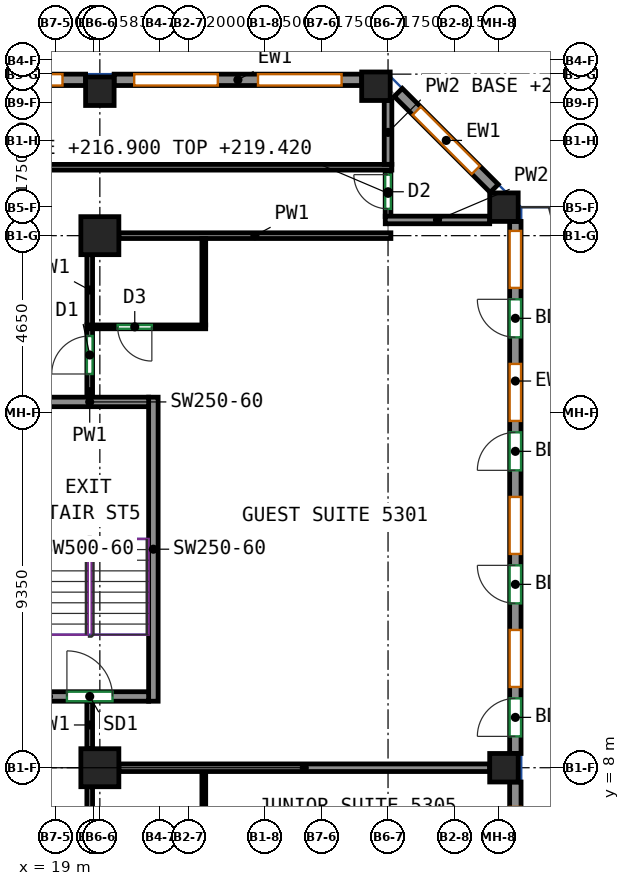
"""IFC4 building model, lengths in metres.
Left out: names, types, materials, properties, quantities, classifications, styles, units other than length and angle.
Written with IfcOpenShell. Run it as: python <this file> out.ifc"""

import sys

from ifc_helpers import new_model, si_unit, direction, frame, frame_2d, origin, origin_2d, place, context, subcontext, project, spatial, rectangle, extrude, source, transform, mapped, element, fill, save


model = new_model("IFC4")
c1 = context("Model", 3, precision=1e-05, world=origin(), true_north=direction((0.0, 1.0)))
c2 = subcontext(c1, "Body", "Model", "MODEL_VIEW")
j1 = project(units=[si_unit("LENGTHUNIT", "METRE"), si_unit("PLANEANGLEUNIT", "RADIAN")], contexts=[c1])
p1 = place(None, origin())
s1 = spatial("IfcSite", under=j1, at=p1, CompositionType="ELEMENT")
p2 = place(p1, origin())
s2 = spatial("IfcBuilding", under=s1, at=p2, CompositionType="ELEMENT")
p3 = place(p2, frame((0.0, 0.0, 216.9)))
s3 = spatial("IfcBuildingStorey", under=s2, at=p3, CompositionType="ELEMENT", Elevation=216.9)
m1 = source(origin(), c2, "Body", "SweptSolid", [
    extrude(rectangle(XDim=1.0, YDim=1.0, at=origin_2d()), origin(), (0.0, 0.0, 1.0), 3.12),
])
for number, where, z_axis, x_axis in (
    (1, (20.167, 8.0, 0.0), (0.0, 0.0, 1.0), (1.0, 0.0, 0.0)),
    (2, (20.167, 22.0, 0.0), (0.0, 0.0, 1.0), (1.0, 0.0, 0.0)),
):
    element("IfcColumn", number, at=place(p3, frame(where, z_axis=z_axis, x_axis=x_axis)), inside=s3, PredefinedType="COLUMN", context=c2, shape_type="MappedRepresentation", body=[
        mapped(m1, transform((0.0, 0.0, 0.0))),
    ])
m2 = source(origin(), c2, "Body", "SweptSolid", [
    extrude(rectangle(XDim=0.75, YDim=0.75, at=origin_2d()), origin(), (0.0, 0.0, 1.0), 3.12),
])
for number, where, z_axis, x_axis in (
    (3, (20.167, 25.8, 0.0), (0.0, 0.0, 1.0), (1.0, 0.0, 0.0)),
    (4, (27.432, 25.932, 0.0), (0.0, 0.0, 1.0), (1.0, 0.0, 0.0)),
    (5, (30.8, 8.0, 0.0), (0.0, 0.0, 1.0), (1.0, 0.0, 0.0)),
    (6, (30.8, 22.75, 0.0), (0.0, 0.0, 1.0), (1.0, 0.0, 0.0)),
):
    element("IfcColumn", number, at=place(p3, frame(where, z_axis=z_axis, x_axis=x_axis)), inside=s3, PredefinedType="COLUMN", context=c2, shape_type="MappedRepresentation", body=[
        mapped(m2, transform((0.0, 0.0, 0.0))),
    ])
m3 = source(origin(), c2, "Body", "SweptSolid", [
    extrude(rectangle(XDim=8.0, YDim=0.25, at=frame_2d((4.0, 0.0))), origin(), (0.0, 0.0, 1.0), 3.12),
])
p4 = place(p3, frame((21.575, 9.75, 0.0), z_axis=(0.0, 0.0, 1.0), x_axis=(0.0, 1.0, 0.0)))
e7 = element("IfcWall", 7, at=p4, inside=s3, PredefinedType="SHEAR", context=c2, shape_type="MappedRepresentation", body=[
    mapped(m3, transform((0.0, 0.0, 0.0))),
])
m4 = source(origin(), c2, "Body", "SweptSolid", [
    extrude(rectangle(XDim=3.1, YDim=0.25, at=frame_2d((1.55, 0.0))), origin(), (0.0, 0.0, 1.0), 3.12),
])
p5 = place(p3, frame((18.35, 9.875, 0.0), z_axis=(0.0, 0.0, 1.0), x_axis=(1.0, 0.0, 0.0)))
e8 = element("IfcWall", 8, at=p5, inside=s3, PredefinedType="SHEAR", context=c2, shape_type="MappedRepresentation", body=[
    mapped(m4, transform((0.0, 0.0, 0.0))),
])
p6 = place(p5, frame((0.95, 0.0, 0.0)))
e9 = element("IfcOpeningElement", 9, at=p6, cuts=e8, PredefinedType="OPENING", context=c2, shape_type="SweptSolid", body=[
    extrude(rectangle(XDim=1.2, YDim=2.1, at=frame_2d((0.6, 1.05))), frame((0.0, 0.135, 0.0), z_axis=(0.0, -1.0, 0.0), x_axis=(1.0, 0.0, 0.0)), (0.0, 0.0, 1.0), 0.27),
])
p7 = place(p3, frame((18.35, 17.625, 0.0), z_axis=(0.0, 0.0, 1.0), x_axis=(1.0, 0.0, 0.0)))
e10 = element("IfcWall", 10, at=p7, inside=s3, PredefinedType="SHEAR", context=c2, shape_type="MappedRepresentation", body=[
    mapped(m4, transform((0.0, 0.0, 0.0))),
])
m5 = source(origin(), c2, "Body", "SweptSolid", [
    extrude(rectangle(XDim=7.812, YDim=0.3, at=frame_2d((3.906, 0.0))), origin(), (0.0, 0.0, 1.0), 3.12),
])
p8 = place(p3, frame((31.1, -0.188, 0.0), z_axis=(0.0, 0.0, 1.0), x_axis=(0.0, 1.0, 0.0)))
e11 = element("IfcWall", 11, at=p8, inside=s3, PredefinedType="SOLIDWALL", context=c2, shape_type="MappedRepresentation", body=[
    mapped(m5, transform((0.0, 0.0, 0.0))),
])
p9 = place(p8, frame((1.75, 0.0, 0.85)))
e12 = element("IfcOpeningElement", 12, at=p9, cuts=e11, PredefinedType="OPENING", context=c2, shape_type="SweptSolid", body=[
    extrude(rectangle(XDim=1.5, YDim=1.95, at=frame_2d((0.75, 0.975))), frame((0.0, 0.16, 0.0), z_axis=(0.0, -1.0, 0.0), x_axis=(1.0, 0.0, 0.0)), (0.0, 0.0, 1.0), 0.32),
])
p10 = place(p8, frame((5.656, 0.0, 0.85)))
e13 = element("IfcOpeningElement", 13, at=p10, cuts=e11, PredefinedType="OPENING", context=c2, shape_type="SweptSolid", body=[
    extrude(rectangle(XDim=1.5, YDim=1.95, at=frame_2d((0.75, 0.975))), frame((0.0, 0.16, 0.0), z_axis=(0.0, -1.0, 0.0), x_axis=(1.0, 0.0, 0.0)), (0.0, 0.0, 1.0), 0.32),
])
m6 = source(origin(), c2, "Body", "SweptSolid", [
    extrude(rectangle(XDim=14.0, YDim=0.3, at=frame_2d((7.0, 0.0))), origin(), (0.0, 0.0, 1.0), 3.12),
])
p11 = place(p3, frame((31.1, 8.375, 0.0), z_axis=(0.0, 0.0, 1.0), x_axis=(0.0, 1.0, 0.0)))
e14 = element("IfcWall", 14, at=p11, inside=s3, PredefinedType="SOLIDWALL", context=c2, shape_type="MappedRepresentation", body=[
    mapped(m6, transform((0.0, 0.0, 0.0))),
])
p12 = place(p11, frame((1.75, 0.0, 0.85)))
e15 = element("IfcOpeningElement", 15, at=p12, cuts=e14, PredefinedType="OPENING", context=c2, shape_type="SweptSolid", body=[
    extrude(rectangle(XDim=1.5, YDim=1.95, at=frame_2d((0.75, 0.975))), frame((0.0, 0.16, 0.0), z_axis=(0.0, -1.0, 0.0), x_axis=(1.0, 0.0, 0.0)), (0.0, 0.0, 1.0), 0.32),
])
p13 = place(p11, frame((0.45, 0.0, 0.0)))
e16 = element("IfcOpeningElement", 16, at=p13, cuts=e14, PredefinedType="OPENING", context=c2, shape_type="SweptSolid", body=[
    extrude(rectangle(XDim=1.0, YDim=2.1, at=frame_2d((0.5, 1.05))), frame((0.0, 0.16, 0.0), z_axis=(0.0, -1.0, 0.0), x_axis=(1.0, 0.0, 0.0)), (0.0, 0.0, 1.0), 0.32),
])
p14 = place(p11, frame((5.25, 0.0, 0.85)))
e17 = element("IfcOpeningElement", 17, at=p14, cuts=e14, PredefinedType="OPENING", context=c2, shape_type="SweptSolid", body=[
    extrude(rectangle(XDim=1.5, YDim=1.95, at=frame_2d((0.75, 0.975))), frame((0.0, 0.16, 0.0), z_axis=(0.0, -1.0, 0.0), x_axis=(1.0, 0.0, 0.0)), (0.0, 0.0, 1.0), 0.32),
])
p15 = place(p11, frame((3.95, 0.0, 0.0)))
e18 = element("IfcOpeningElement", 18, at=p15, cuts=e14, PredefinedType="OPENING", context=c2, shape_type="SweptSolid", body=[
    extrude(rectangle(XDim=1.0, YDim=2.1, at=frame_2d((0.5, 1.05))), frame((0.0, 0.16, 0.0), z_axis=(0.0, -1.0, 0.0), x_axis=(1.0, 0.0, 0.0)), (0.0, 0.0, 1.0), 0.32),
])
p16 = place(p11, frame((8.75, 0.0, 0.85)))
e19 = element("IfcOpeningElement", 19, at=p16, cuts=e14, PredefinedType="OPENING", context=c2, shape_type="SweptSolid", body=[
    extrude(rectangle(XDim=1.5, YDim=1.95, at=frame_2d((0.75, 0.975))), frame((0.0, 0.16, 0.0), z_axis=(0.0, -1.0, 0.0), x_axis=(1.0, 0.0, 0.0)), (0.0, 0.0, 1.0), 0.32),
])
p17 = place(p11, frame((7.45, 0.0, 0.0)))
e20 = element("IfcOpeningElement", 20, at=p17, cuts=e14, PredefinedType="OPENING", context=c2, shape_type="SweptSolid", body=[
    extrude(rectangle(XDim=1.0, YDim=2.1, at=frame_2d((0.5, 1.05))), frame((0.0, 0.16, 0.0), z_axis=(0.0, -1.0, 0.0), x_axis=(1.0, 0.0, 0.0)), (0.0, 0.0, 1.0), 0.32),
])
p18 = place(p11, frame((12.25, 0.0, 0.85)))
e21 = element("IfcOpeningElement", 21, at=p18, cuts=e14, PredefinedType="OPENING", context=c2, shape_type="SweptSolid", body=[
    extrude(rectangle(XDim=1.5, YDim=1.95, at=frame_2d((0.75, 0.975))), frame((0.0, 0.16, 0.0), z_axis=(0.0, -1.0, 0.0), x_axis=(1.0, 0.0, 0.0)), (0.0, 0.0, 1.0), 0.32),
])
p19 = place(p11, frame((10.95, 0.0, 0.0)))
e22 = element("IfcOpeningElement", 22, at=p19, cuts=e14, PredefinedType="OPENING", context=c2, shape_type="SweptSolid", body=[
    extrude(rectangle(XDim=1.0, YDim=2.1, at=frame_2d((0.5, 1.05))), frame((0.0, 0.16, 0.0), z_axis=(0.0, -1.0, 0.0), x_axis=(1.0, 0.0, 0.0)), (0.0, 0.0, 1.0), 0.32),
])
m7 = source(origin(), c2, "Body", "SweptSolid", [
    extrude(rectangle(XDim=3.571, YDim=0.3, at=frame_2d((1.786, 0.0))), origin(), (0.0, 0.0, 1.0), 3.12),
])
p20 = place(p3, frame((30.544, 23.244, 0.0), z_axis=(0.0, 0.0, 1.0), x_axis=(-0.707140964879, 0.707072595841, 0.0)))
e23 = element("IfcWall", 23, at=p20, inside=s3, PredefinedType="SOLIDWALL", context=c2, shape_type="MappedRepresentation", body=[
    mapped(m7, transform((0.0, 0.0, 0.0))),
])
p21 = place(p20, frame((0.686, 0.0, 0.85)))
e24 = element("IfcOpeningElement", 24, at=p21, cuts=e23, PredefinedType="OPENING", context=c2, shape_type="SweptSolid", body=[
    extrude(rectangle(XDim=2.2, YDim=1.95, at=frame_2d((1.1, 0.975))), frame((0.0, 0.16, 0.0), z_axis=(0.0, -1.0, 0.0), x_axis=(1.0, 0.0, 0.0)), (0.0, 0.0, 1.0), 0.32),
])
m8 = source(origin(), c2, "Body", "SweptSolid", [
    extrude(rectangle(XDim=6.515, YDim=0.3, at=frame_2d((3.258, 0.0))), origin(), (0.0, 0.0, 1.0), 3.12),
])
p22 = place(p3, frame((27.057, 26.1, 0.0), z_axis=(0.0, 0.0, 1.0), x_axis=(-1.0, 0.0, 0.0)))
e25 = element("IfcWall", 25, at=p22, inside=s3, PredefinedType="SOLIDWALL", context=c2, shape_type="MappedRepresentation", body=[
    mapped(m8, transform((0.0, 0.0, 0.0))),
])
p23 = place(p22, frame((0.529, 0.0, 0.85)))
e26 = element("IfcOpeningElement", 26, at=p23, cuts=e25, PredefinedType="OPENING", context=c2, shape_type="SweptSolid", body=[
    extrude(rectangle(XDim=2.2, YDim=1.95, at=frame_2d((1.1, 0.975))), frame((0.0, 0.16, 0.0), z_axis=(0.0, -1.0, 0.0), x_axis=(1.0, 0.0, 0.0)), (0.0, 0.0, 1.0), 0.32),
])
p24 = place(p22, frame((3.786, 0.0, 0.85)))
e27 = element("IfcOpeningElement", 27, at=p24, cuts=e25, PredefinedType="OPENING", context=c2, shape_type="SweptSolid", body=[
    extrude(rectangle(XDim=2.2, YDim=1.95, at=frame_2d((1.1, 0.975))), frame((0.0, 0.16, 0.0), z_axis=(0.0, -1.0, 0.0), x_axis=(1.0, 0.0, 0.0)), (0.0, 0.0, 1.0), 0.32),
])
m9 = source(origin(), c2, "Body", "SweptSolid", [
    extrude(rectangle(XDim=6.833, YDim=0.3, at=frame_2d((3.417, 0.0))), origin(), (0.0, 0.0, 1.0), 3.12),
])
p25 = place(p3, frame((19.792, 26.1, 0.0), z_axis=(0.0, 0.0, 1.0), x_axis=(-1.0, 0.0, 0.0)))
e28 = element("IfcWall", 28, at=p25, inside=s3, PredefinedType="SOLIDWALL", context=c2, shape_type="MappedRepresentation", body=[
    mapped(m9, transform((0.0, 0.0, 0.0))),
])
p26 = place(p25, frame((0.608, 0.0, 0.85)))
e29 = element("IfcOpeningElement", 29, at=p26, cuts=e28, PredefinedType="OPENING", context=c2, shape_type="SweptSolid", body=[
    extrude(rectangle(XDim=2.2, YDim=1.95, at=frame_2d((1.1, 0.975))), frame((0.0, 0.16, 0.0), z_axis=(0.0, -1.0, 0.0), x_axis=(1.0, 0.0, 0.0)), (0.0, 0.0, 1.0), 0.32),
])
p27 = place(p25, frame((4.025, 0.0, 0.85)))
e30 = element("IfcOpeningElement", 30, at=p27, cuts=e28, PredefinedType="OPENING", context=c2, shape_type="SweptSolid", body=[
    extrude(rectangle(XDim=2.2, YDim=1.95, at=frame_2d((1.1, 0.975))), frame((0.0, 0.16, 0.0), z_axis=(0.0, -1.0, 0.0), x_axis=(1.0, 0.0, 0.0)), (0.0, 0.0, 1.0), 0.32),
])
p28 = place(p3, frame((19.9, 5.64, 0.0), z_axis=(0.0, 0.0, 1.0), x_axis=(0.0, 1.0, 0.0)))
e31 = element("IfcWall", 31, at=p28, inside=s3, PredefinedType="PARTITIONING", context=c2, shape_type="SweptSolid", body=[
    extrude(rectangle(XDim=1.86, YDim=0.15, at=frame_2d((0.93, 0.0))), origin(), (0.0, 0.0, 1.0), 2.52),
])
p29 = place(p3, frame((19.9, 17.75, 0.0), z_axis=(0.0, 0.0, 1.0), x_axis=(0.0, 1.0, 0.0)))
e32 = element("IfcWall", 32, at=p29, inside=s3, PredefinedType="PARTITIONING", context=c2, shape_type="SweptSolid", body=[
    extrude(rectangle(XDim=1.81, YDim=0.15, at=frame_2d((0.905, 0.0))), origin(), (0.0, 0.0, 1.0), 3.12),
])
p30 = place(p29, frame((0.61, 0.0, 0.0)))
e33 = element("IfcOpeningElement", 33, at=p30, cuts=e32, PredefinedType="OPENING", context=c2, shape_type="SweptSolid", body=[
    extrude(rectangle(XDim=1.0, YDim=2.1, at=frame_2d((0.5, 1.05))), frame((0.0, 0.085, 0.0), z_axis=(0.0, -1.0, 0.0), x_axis=(1.0, 0.0, 0.0)), (0.0, 0.0, 1.0), 0.17),
])
p31 = place(p3, frame((19.9, 8.5, 0.0), z_axis=(0.0, 0.0, 1.0), x_axis=(0.0, 1.0, 0.0)))
e34 = element("IfcWall", 34, at=p31, inside=s3, PredefinedType="PARTITIONING", context=c2, shape_type="SweptSolid", body=[
    extrude(rectangle(XDim=1.25, YDim=0.15, at=frame_2d((0.625, 0.0))), origin(), (0.0, 0.0, 1.0), 3.12),
])
p32 = place(p3, frame((20.667, 22.0, 0.0), z_axis=(0.0, 0.0, 1.0), x_axis=(1.0, 0.0, 0.0)))
e35 = element("IfcWall", 35, at=p32, inside=s3, PredefinedType="PARTITIONING", context=c2, shape_type="SweptSolid", body=[
    extrude(rectangle(XDim=7.158, YDim=0.15, at=frame_2d((3.579, 0.0))), origin(), (0.0, 0.0, 1.0), 3.12),
])
p33 = place(p3, frame((19.9, 19.64, 0.0), z_axis=(0.0, 0.0, 1.0), x_axis=(0.0, 1.0, 0.0)))
e36 = element("IfcWall", 36, at=p33, inside=s3, PredefinedType="PARTITIONING", context=c2, shape_type="SweptSolid", body=[
    extrude(rectangle(XDim=1.86, YDim=0.15, at=frame_2d((0.93, 0.0))), origin(), (0.0, 0.0, 1.0), 3.12),
])
p34 = place(p3, frame((27.75, 22.503, 0.0), z_axis=(0.0, 0.0, 1.0), x_axis=(0.0, 1.0, 0.0)))
e37 = element("IfcWall", 37, at=p34, inside=s3, PredefinedType="PARTITIONING", context=c2, shape_type="SweptSolid", body=[
    extrude(rectangle(XDim=1.222, YDim=0.15, at=frame_2d((0.611, 0.0))), origin(), (0.0, 0.0, 1.0), 2.52),
])
p35 = place(p34, frame((0.202, 0.0, 0.0)))
e38 = element("IfcOpeningElement", 38, at=p35, cuts=e37, PredefinedType="OPENING", context=c2, shape_type="SweptSolid", body=[
    extrude(rectangle(XDim=0.9, YDim=2.1, at=frame_2d((0.45, 1.05))), frame((0.0, 0.085, 0.0), z_axis=(0.0, -1.0, 0.0), x_axis=(1.0, 0.0, 0.0)), (0.0, 0.0, 1.0), 0.17),
])
p36 = place(p3, frame((27.85, 23.8, 0.0), z_axis=(0.0, 0.0, 1.0), x_axis=(-1.0, 0.0, 0.0)))
e39 = element("IfcWall", 39, at=p36, inside=s3, PredefinedType="PARTITIONING", context=c2, shape_type="SweptSolid", body=[
    extrude(rectangle(XDim=45.7, YDim=0.15, at=frame_2d((22.85, 0.0))), origin(), (0.0, 0.0, 1.0), 3.12),
])
p37 = place(p36, frame((16.838, 0.0, 0.0)))
e40 = element("IfcOpeningElement", 40, at=p37, cuts=e39, PredefinedType="OPENING", context=c2, shape_type="SweptSolid", body=[
    extrude(rectangle(XDim=1.0, YDim=2.1, at=frame_2d((0.5, 1.05))), frame((0.0, 0.085, 0.0), z_axis=(0.0, -1.0, 0.0), x_axis=(1.0, 0.0, 0.0)), (0.0, 0.0, 1.0), 0.17),
])
p38 = place(p3, frame((22.902, 5.65, 0.0), z_axis=(0.0, 0.0, 1.0), x_axis=(0.0, 1.0, 0.0)))
e41 = element("IfcWall", 41, at=p38, inside=s3, PredefinedType="PARTITIONING", context=c2, shape_type="SweptSolid", body=[
    extrude(rectangle(XDim=2.25, YDim=0.1, at=frame_2d((1.125, 0.0))), origin(), (0.0, 0.0, 1.0), 3.12),
])
p39 = place(p3, frame((20.667, 8.0, 0.0), z_axis=(0.0, 0.0, 1.0), x_axis=(1.0, 0.0, 0.0)))
e42 = element("IfcWall", 42, at=p39, inside=s3, PredefinedType="PARTITIONING", context=c2, shape_type="SweptSolid", body=[
    extrude(rectangle(XDim=9.758, YDim=0.2, at=frame_2d((4.879, 0.0))), origin(), (0.0, 0.0, 1.0), 2.52),
])
p40 = place(p3, frame((22.952, 19.6, 0.0), z_axis=(0.0, 0.0, 1.0), x_axis=(-1.0, 0.0, 0.0)))
e43 = element("IfcWall", 43, at=p40, inside=s3, PredefinedType="PARTITIONING", context=c2, shape_type="SweptSolid", body=[
    extrude(rectangle(XDim=3.125, YDim=0.1, at=frame_2d((1.562, 0.0))), origin(), (0.0, 0.0, 1.0), 3.12),
])
p41 = place(p40, frame((1.417, 0.0, 0.0)))
e44 = element("IfcOpeningElement", 44, at=p41, cuts=e43, PredefinedType="OPENING", context=c2, shape_type="SweptSolid", body=[
    extrude(rectangle(XDim=0.9, YDim=2.1, at=frame_2d((0.45, 1.05))), frame((0.0, 0.06, 0.0), z_axis=(0.0, -1.0, 0.0), x_axis=(1.0, 0.0, 0.0)), (0.0, 0.0, 1.0), 0.12),
])
p42 = place(p3, frame((22.902, 19.65, 0.0), z_axis=(0.0, 0.0, 1.0), x_axis=(0.0, 1.0, 0.0)))
e45 = element("IfcWall", 45, at=p42, inside=s3, PredefinedType="PARTITIONING", context=c2, shape_type="SweptSolid", body=[
    extrude(rectangle(XDim=2.273, YDim=0.1, at=frame_2d((1.137, 0.0))), origin(), (0.0, 0.0, 1.0), 3.12),
])
p43 = place(p3, frame((30.425, 22.413, 0.0), z_axis=(0.0, 0.0, 1.0), x_axis=(-1.0, 0.0, 0.0)))
e46 = element("IfcWall", 46, at=p43, inside=s3, PredefinedType="PARTITIONING", context=c2, shape_type="SweptSolid", body=[
    extrude(rectangle(XDim=2.748, YDim=0.2, at=frame_2d((1.374, 0.0))), origin(), (0.0, 0.0, 1.0), 2.52),
])
p44 = place(p3, frame((27.75, 25.557, 0.0), z_axis=(0.0, 0.0, 1.0), x_axis=(0.0, -1.0, 0.0)))
e47 = element("IfcWall", 47, at=p44, inside=s3, PredefinedType="PARTITIONING", context=c2, shape_type="SweptSolid", body=[
    extrude(rectangle(XDim=1.68, YDim=0.2, at=frame_2d((0.84, 0.0))), origin(), (0.0, 0.0, 1.0), 2.52),
])
p45 = place(p12, origin())
e48 = element("IfcWindow", 48, at=p45, inside=s3, PartitioningType="SINGLE_PANEL", PredefinedType="WINDOW", context=c2, shape_type="SweptSolid", body=[
    extrude(rectangle(XDim=1.5, YDim=1.95, at=frame_2d((0.75, 0.975))), frame((0.0, 0.03, 0.0), z_axis=(0.0, -1.0, 0.0), x_axis=(1.0, 0.0, 0.0)), (0.0, 0.0, 1.0), 0.06),
])
fill(e15, e48)
p46 = place(p13, origin())
e49 = element("IfcDoor", 49, at=p46, inside=s3, OperationType="SINGLE_SWING_LEFT", PredefinedType="DOOR", context=c2, shape_type="SweptSolid", body=[
    extrude(rectangle(XDim=1.0, YDim=2.1, at=frame_2d((0.5, 1.05))), frame((0.0, 0.025, 0.0), z_axis=(0.0, -1.0, 0.0), x_axis=(1.0, 0.0, 0.0)), (0.0, 0.0, 1.0), 0.05),
])
fill(e16, e49)
p47 = place(p14, origin())
e50 = element("IfcWindow", 50, at=p47, inside=s3, PartitioningType="SINGLE_PANEL", PredefinedType="WINDOW", context=c2, shape_type="SweptSolid", body=[
    extrude(rectangle(XDim=1.5, YDim=1.95, at=frame_2d((0.75, 0.975))), frame((0.0, 0.03, 0.0), z_axis=(0.0, -1.0, 0.0), x_axis=(1.0, 0.0, 0.0)), (0.0, 0.0, 1.0), 0.06),
])
fill(e17, e50)
p48 = place(p15, origin())
e51 = element("IfcDoor", 51, at=p48, inside=s3, OperationType="SINGLE_SWING_RIGHT", PredefinedType="DOOR", context=c2, shape_type="SweptSolid", body=[
    extrude(rectangle(XDim=1.0, YDim=2.1, at=frame_2d((0.5, 1.05))), frame((0.0, 0.025, 0.0), z_axis=(0.0, -1.0, 0.0), x_axis=(1.0, 0.0, 0.0)), (0.0, 0.0, 1.0), 0.05),
])
fill(e18, e51)
p49 = place(p16, origin())
e52 = element("IfcWindow", 52, at=p49, inside=s3, PartitioningType="SINGLE_PANEL", PredefinedType="WINDOW", context=c2, shape_type="SweptSolid", body=[
    extrude(rectangle(XDim=1.5, YDim=1.95, at=frame_2d((0.75, 0.975))), frame((0.0, 0.03, 0.0), z_axis=(0.0, -1.0, 0.0), x_axis=(1.0, 0.0, 0.0)), (0.0, 0.0, 1.0), 0.06),
])
fill(e19, e52)
p50 = place(p17, origin())
e53 = element("IfcDoor", 53, at=p50, inside=s3, OperationType="SINGLE_SWING_LEFT", PredefinedType="DOOR", context=c2, shape_type="SweptSolid", body=[
    extrude(rectangle(XDim=1.0, YDim=2.1, at=frame_2d((0.5, 1.05))), frame((0.0, 0.025, 0.0), z_axis=(0.0, -1.0, 0.0), x_axis=(1.0, 0.0, 0.0)), (0.0, 0.0, 1.0), 0.05),
])
fill(e20, e53)
p51 = place(p18, origin())
e54 = element("IfcWindow", 54, at=p51, inside=s3, PartitioningType="SINGLE_PANEL", PredefinedType="WINDOW", context=c2, shape_type="SweptSolid", body=[
    extrude(rectangle(XDim=1.5, YDim=1.95, at=frame_2d((0.75, 0.975))), frame((0.0, 0.03, 0.0), z_axis=(0.0, -1.0, 0.0), x_axis=(1.0, 0.0, 0.0)), (0.0, 0.0, 1.0), 0.06),
])
fill(e21, e54)
p52 = place(p19, origin())
e55 = element("IfcDoor", 55, at=p52, inside=s3, OperationType="SINGLE_SWING_RIGHT", PredefinedType="DOOR", context=c2, shape_type="SweptSolid", body=[
    extrude(rectangle(XDim=1.0, YDim=2.1, at=frame_2d((0.5, 1.05))), frame((0.0, 0.025, 0.0), z_axis=(0.0, -1.0, 0.0), x_axis=(1.0, 0.0, 0.0)), (0.0, 0.0, 1.0), 0.05),
])
fill(e22, e55)
p53 = place(p21, origin())
e56 = element("IfcWindow", 56, at=p53, inside=s3, PartitioningType="SINGLE_PANEL", PredefinedType="WINDOW", context=c2, shape_type="SweptSolid", body=[
    extrude(rectangle(XDim=2.2, YDim=1.95, at=frame_2d((1.1, 0.975))), frame((0.0, 0.03, 0.0), z_axis=(0.0, -1.0, 0.0), x_axis=(1.0, 0.0, 0.0)), (0.0, 0.0, 1.0), 0.06),
])
fill(e24, e56)
p54 = place(p23, origin())
e57 = element("IfcWindow", 57, at=p54, inside=s3, PartitioningType="SINGLE_PANEL", PredefinedType="WINDOW", context=c2, shape_type="SweptSolid", body=[
    extrude(rectangle(XDim=2.2, YDim=1.95, at=frame_2d((1.1, 0.975))), frame((0.0, 0.03, 0.0), z_axis=(0.0, -1.0, 0.0), x_axis=(1.0, 0.0, 0.0)), (0.0, 0.0, 1.0), 0.06),
])
fill(e26, e57)
p55 = place(p24, origin())
e58 = element("IfcWindow", 58, at=p55, inside=s3, PartitioningType="SINGLE_PANEL", PredefinedType="WINDOW", context=c2, shape_type="SweptSolid", body=[
    extrude(rectangle(XDim=2.2, YDim=1.95, at=frame_2d((1.1, 0.975))), frame((0.0, 0.03, 0.0), z_axis=(0.0, -1.0, 0.0), x_axis=(1.0, 0.0, 0.0)), (0.0, 0.0, 1.0), 0.06),
])
fill(e27, e58)
p56 = place(p26, origin())
e59 = element("IfcWindow", 59, at=p56, inside=s3, PartitioningType="SINGLE_PANEL", PredefinedType="WINDOW", context=c2, shape_type="SweptSolid", body=[
    extrude(rectangle(XDim=2.2, YDim=1.95, at=frame_2d((1.1, 0.975))), frame((0.0, 0.03, 0.0), z_axis=(0.0, -1.0, 0.0), x_axis=(1.0, 0.0, 0.0)), (0.0, 0.0, 1.0), 0.06),
])
fill(e29, e59)
p57 = place(p6, origin())
e60 = element("IfcDoor", 60, at=p57, inside=s3, OperationType="DOUBLE_DOOR_SINGLE_SWING", PredefinedType="DOOR", context=c2, shape_type="SweptSolid", body=[
    extrude(rectangle(XDim=1.2, YDim=2.1, at=frame_2d((0.6, 1.05))), frame((0.0, 0.025, 0.0), z_axis=(0.0, -1.0, 0.0), x_axis=(1.0, 0.0, 0.0)), (0.0, 0.0, 1.0), 0.05),
])
fill(e9, e60)
p58 = place(p30, origin())
e61 = element("IfcDoor", 61, at=p58, inside=s3, OperationType="SINGLE_SWING_LEFT", PredefinedType="DOOR", context=c2, shape_type="SweptSolid", body=[
    extrude(rectangle(XDim=1.0, YDim=2.1, at=frame_2d((0.5, 1.05))), frame((0.0, 0.025, 0.0), z_axis=(0.0, -1.0, 0.0), x_axis=(1.0, 0.0, 0.0)), (0.0, 0.0, 1.0), 0.05),
])
fill(e33, e61)
p59 = place(p41, origin())
e62 = element("IfcDoor", 62, at=p59, inside=s3, OperationType="SINGLE_SWING_LEFT", PredefinedType="DOOR", context=c2, shape_type="SweptSolid", body=[
    extrude(rectangle(XDim=0.9, YDim=2.1, at=frame_2d((0.45, 1.05))), frame((0.0, 0.025, 0.0), z_axis=(0.0, -1.0, 0.0), x_axis=(1.0, 0.0, 0.0)), (0.0, 0.0, 1.0), 0.05),
])
fill(e44, e62)
p60 = place(p35, origin())
e63 = element("IfcDoor", 63, at=p60, inside=s3, OperationType="SINGLE_SWING_RIGHT", PredefinedType="DOOR", context=c2, shape_type="SweptSolid", body=[
    extrude(rectangle(XDim=0.9, YDim=2.1, at=frame_2d((0.45, 1.05))), frame((0.0, 0.025, 0.0), z_axis=(0.0, -1.0, 0.0), x_axis=(1.0, 0.0, 0.0)), (0.0, 0.0, 1.0), 0.05),
])
fill(e38, e63)
save(model, sys.argv[1])
